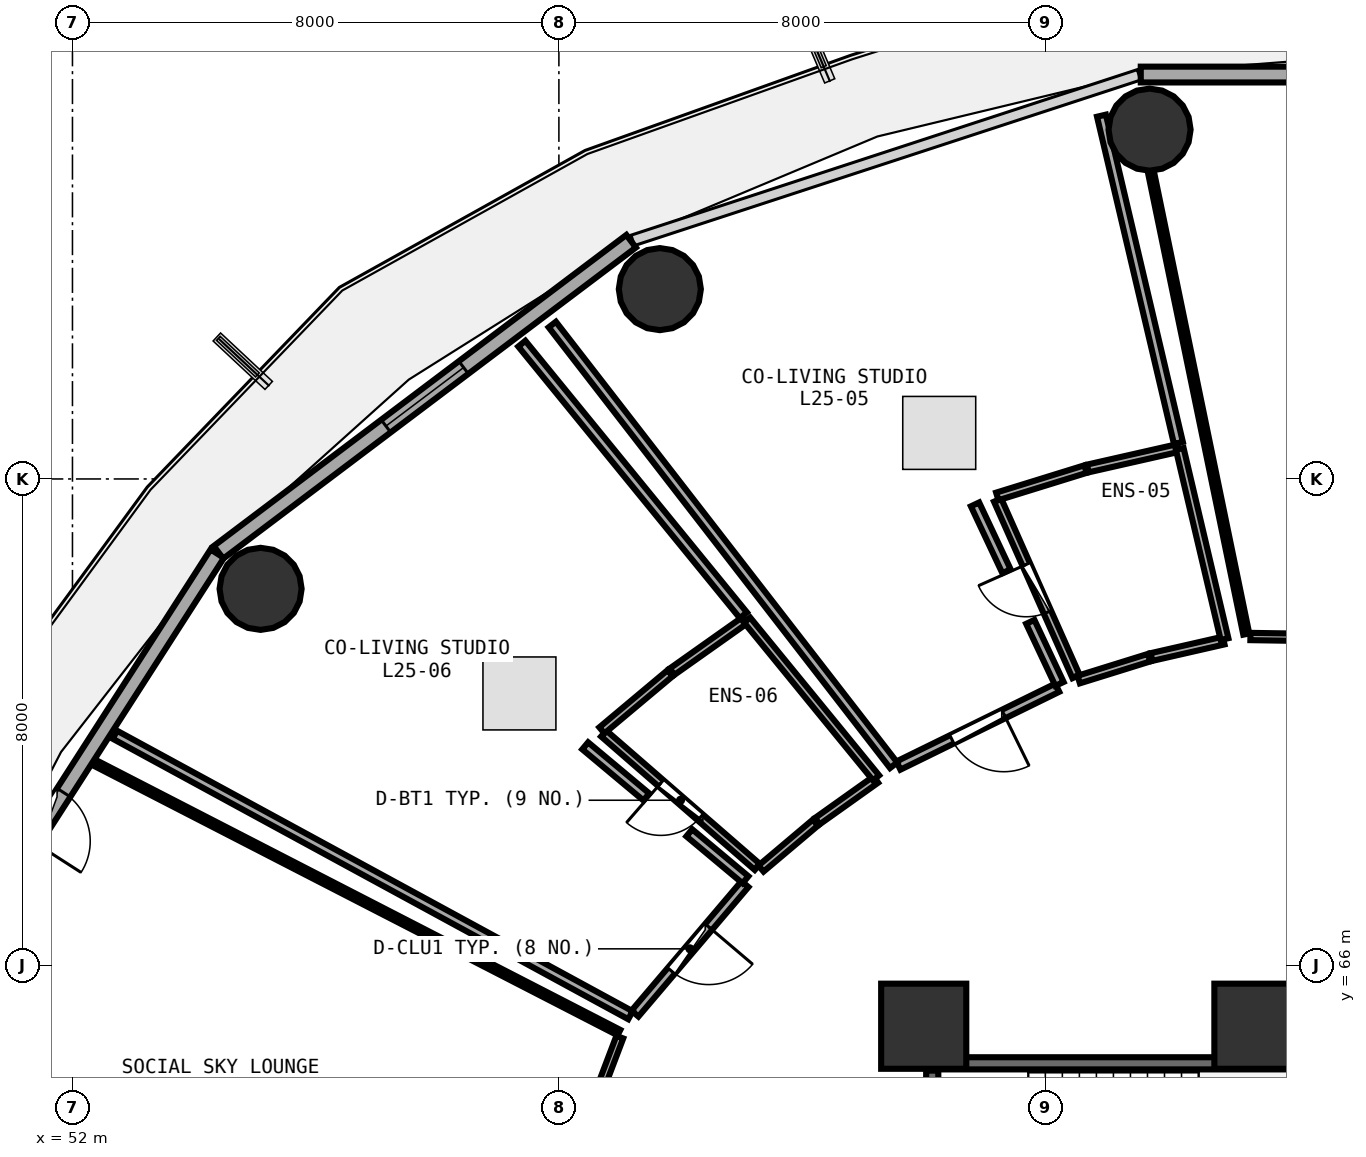
"""IFC4 building model, lengths in metres.
Left out: names, types, materials, properties, quantities, classifications, styles, units other than length and angle.
Written with IfcOpenShell. Run it as: python <this file> out.ifc"""

import sys

from ifc_helpers import new_model, si_unit, direction, frame, frame_2d, origin, origin_2d, place, context, subcontext, project, spatial, rectangle, circle, extrude, element, fill, save


model = new_model("IFC4")
c1 = context("Model", 3, precision=1e-05, world=origin(), true_north=direction((0.0, 1.0)))
c2 = subcontext(c1, "Body", "Model", "MODEL_VIEW")
j1 = project(units=[si_unit("LENGTHUNIT", "METRE"), si_unit("PLANEANGLEUNIT", "RADIAN")], contexts=[c1])
p1 = place(None, origin())
s1 = spatial("IfcSite", under=j1, at=p1, CompositionType="ELEMENT")
p2 = place(p1, origin())
s2 = spatial("IfcBuilding", under=s1, at=p2, CompositionType="ELEMENT")
p3 = place(p2, frame((0.0, 0.0, 98.85)))
s3 = spatial("IfcBuildingStorey", under=s2, at=p3, CompositionType="ELEMENT", Elevation=98.85)
for number, where, z_axis, x_axis in (
    (1, (71.48, 65.0, 0.0), (0.0, 0.0, 1.0), (1.0, 0.0, 0.0)),
    (2, (66.0, 65.0, 0.0), (0.0, 0.0, 1.0), (1.0, 0.0, 0.0)),
):
    element("IfcColumn", number, at=place(p3, frame(where, z_axis=z_axis, x_axis=x_axis)), inside=s3, PredefinedType="PILASTER", context=c2, shape_type="SweptSolid", body=[
        extrude(rectangle(XDim=1.4, YDim=1.4, at=origin_2d()), origin(), (0.0, 0.0, 1.0), 3.75),
    ])
for number, where, z_axis, x_axis in (
    (3, (69.714, 79.745, 0.0), (0.0, 0.0, 1.0), (1.0, 0.0, 0.0)),
    (4, (61.66, 77.122, 0.0), (0.0, 0.0, 1.0), (1.0, 0.0, 0.0)),
    (5, (55.094, 72.193, 0.0), (0.0, 0.0, 1.0), (1.0, 0.0, 0.0)),
):
    element("IfcColumn", number, at=place(p3, frame(where, z_axis=z_axis, x_axis=x_axis)), inside=s3, PredefinedType="COLUMN", context=c2, shape_type="SweptSolid", body=[
        extrude(circle(Radius=0.675, at=origin_2d()), origin(), (0.0, 0.0, 1.0), 3.75),
    ])
p4 = place(p3, frame((78.43, 80.651, 0.0), z_axis=(0.0, 0.0, 1.0), x_axis=(-1.0, 0.0, 0.0)))
e6 = element("IfcWall", 6, at=p4, inside=s3, PredefinedType="SOLIDWALL", context=c2, shape_type="SweptSolid", body=[
    extrude(rectangle(XDim=8.861, YDim=0.26, at=frame_2d((4.43, 0.0))), origin(), (0.0, 0.0, 1.0), 3.475),
])
p5 = place(p4, frame((3.63, 0.0, 0.85)))
e7 = element("IfcOpeningElement", 7, at=p5, cuts=e6, PredefinedType="OPENING", context=c2, shape_type="SweptSolid", body=[
    extrude(rectangle(XDim=1.6, YDim=1.45, at=frame_2d((0.8, 0.725))), frame((0.0, 0.14, 0.0), z_axis=(0.0, -1.0, 0.0), x_axis=(1.0, 0.0, 0.0)), (0.0, 0.0, 1.0), 0.28),
])
p6 = place(p3, frame((61.188, 77.91, 0.0), z_axis=(0.0, 0.0, 1.0), x_axis=(-0.798501507879, -0.601992808857, 0.0)))
e8 = element("IfcWall", 8, at=p6, inside=s3, PredefinedType="SOLIDWALL", context=c2, shape_type="SweptSolid", body=[
    extrude(rectangle(XDim=8.499, YDim=0.26, at=frame_2d((4.25, 0.0))), origin(), (0.0, 0.0, 1.0), 3.475),
])
p7 = place(p6, frame((3.45, 0.0, 0.85)))
e9 = element("IfcOpeningElement", 9, at=p7, cuts=e8, PredefinedType="OPENING", context=c2, shape_type="SweptSolid", body=[
    extrude(rectangle(XDim=1.6, YDim=1.45, at=frame_2d((0.8, 0.725))), frame((0.0, 0.14, 0.0), z_axis=(0.0, -1.0, 0.0), x_axis=(1.0, 0.0, 0.0)), (0.0, 0.0, 1.0), 0.28),
])
p8 = place(p3, frame((54.381, 72.771, 0.0), z_axis=(0.0, 0.0, 1.0), x_axis=(-0.540620528459, -0.841266571432, 0.0)))
e10 = element("IfcWall", 10, at=p8, inside=s3, PredefinedType="SOLIDWALL", context=c2, shape_type="SweptSolid", body=[
    extrude(rectangle(XDim=8.193, YDim=0.26, at=frame_2d((4.096, 0.0))), origin(), (0.0, 0.0, 1.0), 3.475),
])
p9 = place(p8, frame((4.671, 0.0, 0.0)))
e11 = element("IfcOpeningElement", 11, at=p9, cuts=e10, PredefinedType="OPENING", context=c2, shape_type="SweptSolid", body=[
    extrude(rectangle(XDim=0.95, YDim=2.1, at=frame_2d((0.475, 1.05))), frame((0.0, 0.14, 0.0), z_axis=(0.0, -1.0, 0.0), x_axis=(1.0, 0.0, 0.0)), (0.0, 0.0, 1.0), 0.28),
])
p10 = place(p8, frame((5.971, 0.0, 0.85)))
e12 = element("IfcOpeningElement", 12, at=p10, cuts=e10, PredefinedType="OPENING", context=c2, shape_type="SweptSolid", body=[
    extrude(rectangle(XDim=1.2, YDim=1.45, at=frame_2d((0.6, 0.725))), frame((0.0, 0.14, 0.0), z_axis=(0.0, -1.0, 0.0), x_axis=(1.0, 0.0, 0.0)), (0.0, 0.0, 1.0), 0.28),
])
p11 = place(p3, frame((73.42, 64.39, 0.0), z_axis=(0.0, 0.0, 1.0), x_axis=(-1.0, 0.0, 0.0)))
e13 = element("IfcWall", 13, at=p11, inside=s3, PredefinedType="SHEAR", context=c2, shape_type="SweptSolid", body=[
    extrude(rectangle(XDim=7.16, YDim=0.2, at=frame_2d((3.58, 0.0))), origin(), (0.0, 0.0, 1.0), 3.49),
])
p12 = place(p3, frame((66.14, 64.27, 0.0), z_axis=(0.0, 0.0, 1.0), x_axis=(0.0, -1.0, 0.0)))
e14 = element("IfcWall", 14, at=p12, inside=s3, PredefinedType="SHEAR", context=c2, shape_type="SweptSolid", body=[
    extrude(rectangle(XDim=3.07, YDim=0.2, at=frame_2d((1.535, 0.0))), origin(), (0.0, 0.0, 1.0), 3.49),
])
p13 = place(p12, frame((1.01, 0.0, 0.0)))
e15 = element("IfcOpeningElement", 15, at=p13, cuts=e14, PredefinedType="OPENING", context=c2, shape_type="SweptSolid", body=[
    extrude(rectangle(XDim=1.05, YDim=2.1, at=frame_2d((0.525, 1.05))), frame((0.0, 0.11, 0.0), z_axis=(0.0, -1.0, 0.0), x_axis=(1.0, 0.0, 0.0)), (0.0, 0.0, 1.0), 0.22),
])
p14 = place(p3, frame((77.142, 71.318, 0.0), z_axis=(0.0, 0.0, 1.0), x_axis=(-0.999874771211, 0.015825356091, 0.0)))
e16 = element("IfcWall", 16, at=p14, inside=s3, PredefinedType="PARTITIONING", context=c2, shape_type="SweptSolid", body=[
    extrude(rectangle(XDim=5.77, YDim=0.12, at=frame_2d((2.885, 0.0))), origin(), (0.0, 0.0, 1.0), 3.48),
])
p15 = place(p14, frame((2.435, 0.0, 0.0)))
e17 = element("IfcOpeningElement", 17, at=p15, cuts=e16, PredefinedType="OPENING", context=c2, shape_type="SweptSolid", body=[
    extrude(rectangle(XDim=0.9, YDim=2.08, at=frame_2d((0.45, 1.04))), frame((0.0, 0.07, 0.0), z_axis=(0.0, -1.0, 0.0), x_axis=(1.0, 0.0, 0.0)), (0.0, 0.0, 1.0), 0.14),
])
p16 = place(p3, frame((68.506, 70.75, 0.0), z_axis=(0.0, 0.0, 1.0), x_axis=(-0.406231177337, 0.913770337973, 0.0)))
e18 = element("IfcWall", 18, at=p16, inside=s3, PredefinedType="PLUMBINGWALL", context=c2, shape_type="SweptSolid", body=[
    extrude(rectangle(XDim=3.176, YDim=0.13, at=frame_2d((1.588, 0.0))), origin(), (0.0, 0.0, 1.0), 3.175),
])
p17 = place(p16, frame((1.158, 0.0, 0.0)))
e19 = element("IfcOpeningElement", 19, at=p17, cuts=e18, PredefinedType="OPENING", context=c2, shape_type="SweptSolid", body=[
    extrude(rectangle(XDim=0.86, YDim=2.05, at=frame_2d((0.43, 1.025))), frame((0.0, 0.075, 0.0), z_axis=(0.0, -1.0, 0.0), x_axis=(1.0, 0.0, 0.0)), (0.0, 0.0, 1.0), 0.15),
])
p18 = place(p3, frame((68.196, 70.567, 0.0), z_axis=(0.0, 0.0, 1.0), x_axis=(-0.89794088417, -0.440116085296, 0.0)))
e20 = element("IfcWall", 20, at=p18, inside=s3, PredefinedType="PARTITIONING", context=c2, shape_type="SweptSolid", body=[
    extrude(rectangle(XDim=2.909, YDim=0.15, at=frame_2d((1.455, 0.0))), origin(), (0.0, 0.0, 1.0), 3.235),
])
p19 = place(p18, frame((0.98, 0.0, 0.0)))
e21 = element("IfcOpeningElement", 21, at=p19, cuts=e20, PredefinedType="OPENING", context=c2, shape_type="SweptSolid", body=[
    extrude(rectangle(XDim=0.95, YDim=2.08, at=frame_2d((0.475, 1.04))), frame((0.0, 0.085, 0.0), z_axis=(0.0, -1.0, 0.0), x_axis=(1.0, 0.0, 0.0)), (0.0, 0.0, 1.0), 0.17),
])
p20 = place(p3, frame((63.264, 67.619, 0.0), z_axis=(0.0, 0.0, 1.0), x_axis=(-0.75497608509, 0.65575232439, 0.0)))
e22 = element("IfcWall", 22, at=p20, inside=s3, PredefinedType="PLUMBINGWALL", context=c2, shape_type="SweptSolid", body=[
    extrude(rectangle(XDim=3.346, YDim=0.13, at=frame_2d((1.673, 0.0))), origin(), (0.0, 0.0, 1.0), 3.235),
])
p21 = place(p20, frame((1.243, 0.0, 0.0)))
e23 = element("IfcOpeningElement", 23, at=p21, cuts=e22, PredefinedType="OPENING", context=c2, shape_type="SweptSolid", body=[
    extrude(rectangle(XDim=0.86, YDim=2.05, at=frame_2d((0.43, 1.025))), frame((0.0, 0.075, 0.0), z_axis=(0.0, -1.0, 0.0), x_axis=(1.0, 0.0, 0.0)), (0.0, 0.0, 1.0), 0.15),
])
p22 = place(p3, frame((63.06, 67.337, 0.0), z_axis=(0.0, 0.0, 1.0), x_axis=(-0.647519081114, -0.762049236988, 0.0)))
e24 = element("IfcWall", 24, at=p22, inside=s3, PredefinedType="PARTITIONING", context=c2, shape_type="SweptSolid", body=[
    extrude(rectangle(XDim=2.795, YDim=0.15, at=frame_2d((1.397, 0.0))), origin(), (0.0, 0.0, 1.0), 2.925),
])
p23 = place(p22, frame((0.922, 0.0, 0.0)))
e25 = element("IfcOpeningElement", 25, at=p23, cuts=e24, PredefinedType="OPENING", context=c2, shape_type="SweptSolid", body=[
    extrude(rectangle(XDim=0.95, YDim=2.08, at=frame_2d((0.475, 1.04))), frame((0.0, 0.085, 0.0), z_axis=(0.0, -1.0, 0.0), x_axis=(1.0, 0.0, 0.0)), (0.0, 0.0, 1.0), 0.17),
])
p24 = place(p3, frame((61.002, 64.821, 0.0), z_axis=(0.0, 0.0, 1.0), x_axis=(-0.354853458438, -0.934921934193, 0.0)))
e26 = element("IfcWall", 26, at=p24, inside=s3, PredefinedType="PARTITIONING", context=c2, shape_type="SweptSolid", body=[
    extrude(rectangle(XDim=5.282, YDim=0.12, at=frame_2d((2.641, 0.0))), origin(), (0.0, 0.0, 1.0), 3.235),
])
p25 = place(p24, frame((2.191, 0.0, 0.0)))
e27 = element("IfcOpeningElement", 27, at=p25, cuts=e26, PredefinedType="OPENING", context=c2, shape_type="SweptSolid", body=[
    extrude(rectangle(XDim=0.9, YDim=2.08, at=frame_2d((0.45, 1.04))), frame((0.0, 0.07, 0.0), z_axis=(0.0, -1.0, 0.0), x_axis=(1.0, 0.0, 0.0)), (0.0, 0.0, 1.0), 0.14),
])
p26 = place(p3, frame((71.305, 71.449, 0.0), z_axis=(0.0, 0.0, 1.0), x_axis=(-0.202123638545, 0.979360012836, 0.0)))
e28 = element("IfcWall", 28, at=p26, inside=s3, PredefinedType="PARTITIONING", context=c2, shape_type="SweptSolid", body=[
    extrude(rectangle(XDim=7.756, YDim=0.1, at=frame_2d((3.878, 0.0))), origin(), (0.0, 0.0, 1.0), 2.925),
])
p27 = place(p3, frame((70.933, 71.343, 0.0), z_axis=(0.0, 0.0, 1.0), x_axis=(-0.974915720647, -0.222574341818, 0.0)))
e29 = element("IfcWall", 29, at=p27, inside=s3, PredefinedType="PLUMBINGWALL", context=c2, shape_type="SweptSolid", body=[
    extrude(rectangle(XDim=1.218, YDim=0.13, at=frame_2d((0.609, 0.0))), origin(), (0.0, 0.0, 1.0), 2.925),
])
p28 = place(p3, frame((69.707, 71.061, 0.0), z_axis=(0.0, 0.0, 1.0), x_axis=(-0.954873275734, -0.297013513646, 0.0)))
e30 = element("IfcWall", 30, at=p28, inside=s3, PredefinedType="PLUMBINGWALL", context=c2, shape_type="SweptSolid", body=[
    extrude(rectangle(XDim=1.212, YDim=0.13, at=frame_2d((0.606, 0.0))), origin(), (0.0, 0.0, 1.0), 3.48),
])
p29 = place(p3, frame((67.21, 73.713, 0.0), z_axis=(0.0, 0.0, 1.0), x_axis=(0.955249123401, 0.295802488566, 0.0)))
e31 = element("IfcWall", 31, at=p29, inside=s3, PredefinedType="PLUMBINGWALL", context=c2, shape_type="SweptSolid", body=[
    extrude(rectangle(XDim=1.519, YDim=0.13, at=frame_2d((0.759, 0.0))), origin(), (0.0, 0.0, 1.0), 3.48),
])
p30 = place(p3, frame((68.699, 74.172, 0.0), z_axis=(0.0, 0.0, 1.0), x_axis=(0.975247540647, 0.221115884688, 0.0)))
e32 = element("IfcWall", 32, at=p30, inside=s3, PredefinedType="PLUMBINGWALL", context=c2, shape_type="SweptSolid", body=[
    extrude(rectangle(XDim=1.525, YDim=0.13, at=frame_2d((0.762, 0.0))), origin(), (0.0, 0.0, 1.0), 2.925),
])
p31 = place(p3, frame((70.211, 74.494, 0.0), z_axis=(0.0, 0.0, 1.0), x_axis=(0.229284929256, -0.973359348451, 0.0)))
e33 = element("IfcWall", 33, at=p31, inside=s3, PredefinedType="PLUMBINGWALL", context=c2, shape_type="SweptSolid", body=[
    extrude(rectangle(XDim=3.214, YDim=0.13, at=frame_2d((1.607, 0.0))), origin(), (0.0, 0.0, 1.0), 2.925),
])
p32 = place(p3, frame((65.506, 69.292, 0.0), z_axis=(0.0, 0.0, 1.0), x_axis=(-0.612364923916, 0.790575233585, 0.0)))
e34 = element("IfcWall", 34, at=p32, inside=s3, PredefinedType="PARTITIONING", context=c2, shape_type="SweptSolid", body=[
    extrude(rectangle(XDim=9.168, YDim=0.15, at=frame_2d((4.584, 0.0))), origin(), (0.0, 0.0, 1.0), 2.925),
])
p33 = place(p3, frame((68.923, 79.974, 0.0), z_axis=(0.0, 0.0, 1.0), x_axis=(0.228901508724, -0.973449587449, 0.0)))
e35 = element("IfcWall", 35, at=p33, inside=s3, PredefinedType="PARTITIONING", context=c2, shape_type="SweptSolid", body=[
    extrude(rectangle(XDim=5.529, YDim=0.15, at=frame_2d((2.765, 0.0))), origin(), (0.0, 0.0, 1.0), 2.925),
])
p34 = place(p3, frame((66.844, 73.582, 0.0), z_axis=(0.0, 0.0, 1.0), x_axis=(0.42562282943, -0.904900661436, 0.0)))
e36 = element("IfcWall", 36, at=p34, inside=s3, PredefinedType="PARTITIONING", context=c2, shape_type="SweptSolid", body=[
    extrude(rectangle(XDim=1.215, YDim=0.15, at=frame_2d((0.607, 0.0))), origin(), (0.0, 0.0, 1.0), 3.175),
])
p35 = place(p3, frame((67.753, 71.65, 0.0), z_axis=(0.0, 0.0, 1.0), x_axis=(0.425609366017, -0.904906993872, 0.0)))
e37 = element("IfcWall", 37, at=p35, inside=s3, PredefinedType="PARTITIONING", context=c2, shape_type="SweptSolid", body=[
    extrude(rectangle(XDim=1.128, YDim=0.15, at=frame_2d((0.564, 0.0))), origin(), (0.0, 0.0, 1.0), 3.48),
])
p36 = place(p3, frame((65.213, 69.057, 0.0), z_axis=(0.0, 0.0, 1.0), x_axis=(-0.814779575245, -0.579770854531, 0.0)))
e38 = element("IfcWall", 38, at=p36, inside=s3, PredefinedType="PLUMBINGWALL", context=c2, shape_type="SweptSolid", body=[
    extrude(rectangle(XDim=1.181, YDim=0.13, at=frame_2d((0.591, 0.0))), origin(), (0.0, 0.0, 1.0), 2.925),
])
p37 = place(p3, frame((64.219, 68.348, 0.0), z_axis=(0.0, 0.0, 1.0), x_axis=(-0.764137277769, -0.645053657244, 0.0)))
e39 = element("IfcWall", 39, at=p37, inside=s3, PredefinedType="PLUMBINGWALL", context=c2, shape_type="SweptSolid", body=[
    extrude(rectangle(XDim=1.171, YDim=0.13, at=frame_2d((0.585, 0.0))), origin(), (0.0, 0.0, 1.0), 3.48),
])
p38 = place(p3, frame((60.707, 69.866, 0.0), z_axis=(0.0, 0.0, 1.0), x_axis=(0.766482767596, 0.642264872913, 0.0)))
e40 = element("IfcWall", 40, at=p38, inside=s3, PredefinedType="PLUMBINGWALL", context=c2, shape_type="SweptSolid", body=[
    extrude(rectangle(XDim=1.464, YDim=0.13, at=frame_2d((0.732, 0.0))), origin(), (0.0, 0.0, 1.0), 3.48),
])
p39 = place(p3, frame((61.861, 70.831, 0.0), z_axis=(0.0, 0.0, 1.0), x_axis=(0.816339578676, 0.577572239886, 0.0)))
e41 = element("IfcWall", 41, at=p39, inside=s3, PredefinedType="PLUMBINGWALL", context=c2, shape_type="SweptSolid", body=[
    extrude(rectangle(XDim=1.477, YDim=0.13, at=frame_2d((0.738, 0.0))), origin(), (0.0, 0.0, 1.0), 3.48),
])
p40 = place(p3, frame((63.096, 71.679, 0.0), z_axis=(0.0, 0.0, 1.0), x_axis=(0.632781461548, -0.774330434583, 0.0)))
e42 = element("IfcWall", 42, at=p40, inside=s3, PredefinedType="PLUMBINGWALL", context=c2, shape_type="SweptSolid", body=[
    extrude(rectangle(XDim=3.351, YDim=0.13, at=frame_2d((1.676, 0.0))), origin(), (0.0, 0.0, 1.0), 2.925),
])
p41 = place(p3, frame((61.177, 65.181, 0.0), z_axis=(0.0, 0.0, 1.0), x_axis=(-0.878445909545, 0.477841798092, 0.0)))
e43 = element("IfcWall", 43, at=p41, inside=s3, PredefinedType="PARTITIONING", context=c2, shape_type="SweptSolid", body=[
    extrude(rectangle(XDim=9.653, YDim=0.15, at=frame_2d((4.827, 0.0))), origin(), (0.0, 0.0, 1.0), 2.925),
])
p42 = place(p3, frame((59.39, 76.225, 0.0), z_axis=(0.0, 0.0, 1.0), x_axis=(0.632139440809, -0.774854649192, 0.0)))
e44 = element("IfcWall", 44, at=p42, inside=s3, PredefinedType="PARTITIONING", context=c2, shape_type="SweptSolid", body=[
    extrude(rectangle(XDim=5.765, YDim=0.15, at=frame_2d((2.882, 0.0))), origin(), (0.0, 0.0, 1.0), 2.975),
])
p43 = place(p3, frame((60.433, 69.611, 0.0), z_axis=(0.0, 0.0, 1.0), x_axis=(0.767335111176, -0.641246307714, 0.0)))
e45 = element("IfcWall", 45, at=p43, inside=s3, PredefinedType="PARTITIONING", context=c2, shape_type="SweptSolid", body=[
    extrude(rectangle(XDim=1.311, YDim=0.15, at=frame_2d((0.655, 0.0))), origin(), (0.0, 0.0, 1.0), 3.48),
])
p44 = place(p3, frame((62.145, 68.181, 0.0), z_axis=(0.0, 0.0, 1.0), x_axis=(0.767356229846, -0.641221035616, 0.0)))
e46 = element("IfcWall", 46, at=p44, inside=s3, PredefinedType="PARTITIONING", context=c2, shape_type="SweptSolid", body=[
    extrude(rectangle(XDim=1.204, YDim=0.15, at=frame_2d((0.602, 0.0))), origin(), (0.0, 0.0, 1.0), 3.235),
])
p45 = place(p3, frame((52.382, 69.324, 0.0), z_axis=(0.0, 0.0, 1.0), x_axis=(0.889175506344, -0.457566300025, 0.0)))
e47 = element("IfcWall", 47, at=p45, inside=s3, PredefinedType="PARTITIONING", context=c2, shape_type="SweptSolid", body=[
    extrude(rectangle(XDim=9.678, YDim=0.1, at=frame_2d((4.839, 0.0))), origin(), (0.0, 0.0, 1.0), 2.925),
])
p46 = place(p7, origin())
e48 = element("IfcWindow", 48, at=p46, inside=s3, PartitioningType="SINGLE_PANEL", PredefinedType="WINDOW", context=c2, shape_type="SweptSolid", body=[
    extrude(rectangle(XDim=1.6, YDim=1.45, at=frame_2d((0.8, 0.725))), frame((0.0, 0.03, 0.0), z_axis=(0.0, -1.0, 0.0), x_axis=(1.0, 0.0, 0.0)), (0.0, 0.0, 1.0), 0.06),
])
fill(e9, e48)
p47 = place(p9, frame((0.95, 0.0, 0.0), z_axis=(0.0, 0.0, 1.0), x_axis=(-1.0, 0.0, 0.0)))
e49 = element("IfcDoor", 49, at=p47, inside=s3, OperationType="SINGLE_SWING_LEFT", PredefinedType="DOOR", context=c2, shape_type="SweptSolid", body=[
    extrude(rectangle(XDim=0.95, YDim=2.1, at=frame_2d((0.475, 1.05))), frame((0.0, 0.025, 0.0), z_axis=(0.0, -1.0, 0.0), x_axis=(1.0, 0.0, 0.0)), (0.0, 0.0, 1.0), 0.05),
])
fill(e11, e49)
p48 = place(p17, origin())
e50 = element("IfcDoor", 50, at=p48, inside=s3, OperationType="SINGLE_SWING_RIGHT", PredefinedType="DOOR", context=c2, shape_type="SweptSolid", body=[
    extrude(rectangle(XDim=0.86, YDim=2.05, at=frame_2d((0.43, 1.025))), frame((0.0, 0.025, 0.0), z_axis=(0.0, -1.0, 0.0), x_axis=(1.0, 0.0, 0.0)), (0.0, 0.0, 1.0), 0.05),
])
fill(e19, e50)
p49 = place(p19, origin())
e51 = element("IfcDoor", 51, at=p49, inside=s3, OperationType="SINGLE_SWING_LEFT", PredefinedType="DOOR", context=c2, shape_type="SweptSolid", body=[
    extrude(rectangle(XDim=0.95, YDim=2.08, at=frame_2d((0.475, 1.04))), frame((0.0, 0.025, 0.0), z_axis=(0.0, -1.0, 0.0), x_axis=(1.0, 0.0, 0.0)), (0.0, 0.0, 1.0), 0.05),
])
fill(e21, e51)
p50 = place(p21, origin())
e52 = element("IfcDoor", 52, at=p50, inside=s3, OperationType="SINGLE_SWING_RIGHT", PredefinedType="DOOR", context=c2, shape_type="SweptSolid", body=[
    extrude(rectangle(XDim=0.86, YDim=2.05, at=frame_2d((0.43, 1.025))), frame((0.0, 0.025, 0.0), z_axis=(0.0, -1.0, 0.0), x_axis=(1.0, 0.0, 0.0)), (0.0, 0.0, 1.0), 0.05),
])
fill(e23, e52)
p51 = place(p23, origin())
e53 = element("IfcDoor", 53, at=p51, inside=s3, OperationType="SINGLE_SWING_LEFT", PredefinedType="DOOR", context=c2, shape_type="SweptSolid", body=[
    extrude(rectangle(XDim=0.95, YDim=2.08, at=frame_2d((0.475, 1.04))), frame((0.0, 0.025, 0.0), z_axis=(0.0, -1.0, 0.0), x_axis=(1.0, 0.0, 0.0)), (0.0, 0.0, 1.0), 0.05),
])
fill(e25, e53)
save(model, sys.argv[1])
